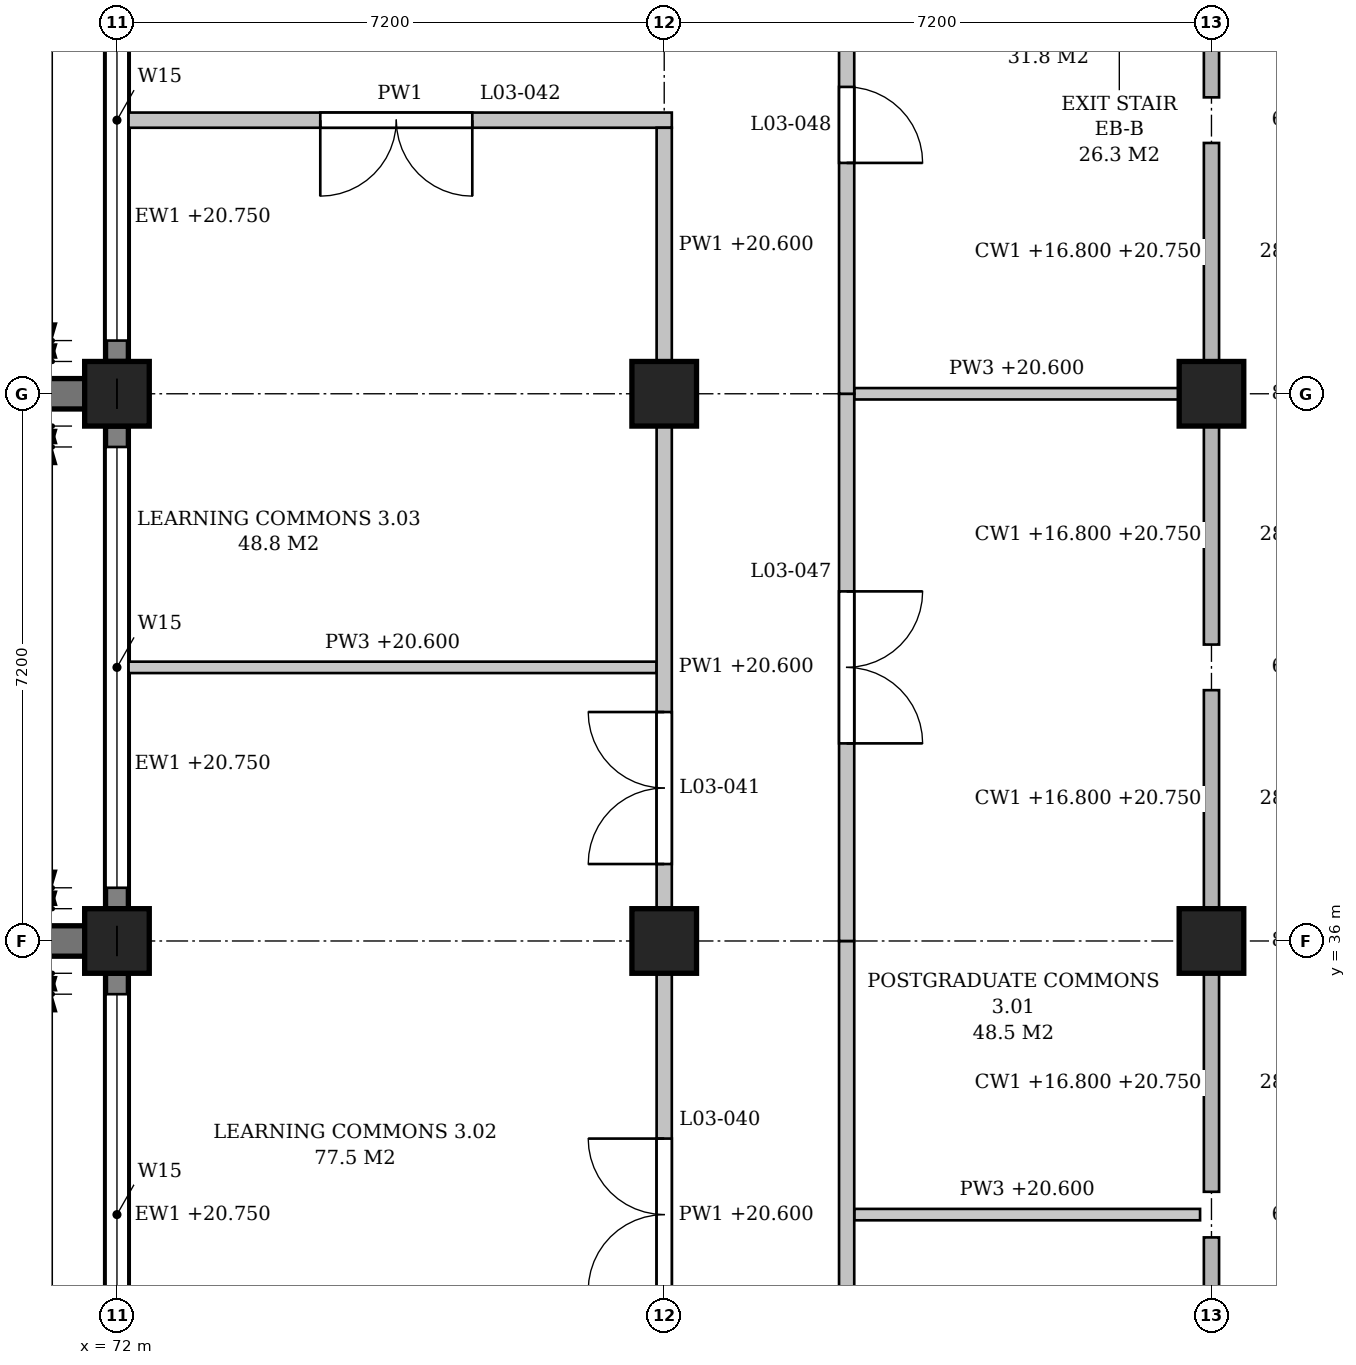
"""IFC4 building model, lengths in metres.
Left out: names, types, materials, properties, quantities, classifications, styles, units other than length and angle.
Written with IfcOpenShell. Run it as: python <this file> out.ifc"""

import sys

from ifc_helpers import new_model, si_unit, direction, frame, frame_2d, origin, origin_2d, place, context, subcontext, project, spatial, polyline, rectangle, outline, extrude, element, fill, save


model = new_model("IFC4")
c1 = context("Model", 3, precision=1e-05, world=origin(), true_north=direction((0.0, 1.0)))
c2 = subcontext(c1, "Body", "Model", "MODEL_VIEW")
j1 = project(units=[si_unit("LENGTHUNIT", "METRE"), si_unit("PLANEANGLEUNIT", "RADIAN")], contexts=[c1])
p1 = place(None, origin())
s1 = spatial("IfcSite", under=j1, at=p1, CompositionType="ELEMENT")
p2 = place(p1, origin())
s2 = spatial("IfcBuilding", under=s1, at=p2, CompositionType="ELEMENT")
p3 = place(p2, frame((0.0, 0.0, 16.8)))
s3 = spatial("IfcBuildingStorey", under=s2, at=p3, CompositionType="ELEMENT", Elevation=16.8)
for number, where, z_axis, x_axis in (
    (1, (72.0, 36.0, 0.0), (0.0, 0.0, 1.0), (1.0, 0.0, 0.0)),
    (2, (72.0, 43.2, 0.0), (0.0, 0.0, 1.0), (1.0, 0.0, 0.0)),
    (3, (79.2, 36.0, 0.0), (0.0, 0.0, 1.0), (1.0, 0.0, 0.0)),
    (4, (79.2, 43.2, 0.0), (0.0, 0.0, 1.0), (1.0, 0.0, 0.0)),
    (5, (86.4, 36.0, 0.0), (0.0, 0.0, 1.0), (1.0, 0.0, 0.0)),
    (6, (86.4, 43.2, 0.0), (0.0, 0.0, 1.0), (1.0, 0.0, 0.0)),
):
    element("IfcColumn", number, at=place(p3, frame(where, z_axis=z_axis, x_axis=x_axis)), inside=s3, PredefinedType="COLUMN", context=c2, shape_type="SweptSolid", body=[
        extrude(rectangle(XDim=0.85, YDim=0.85, at=origin_2d()), origin(), (0.0, 0.0, 1.0), 4.8),
    ])
p4 = place(p3, frame((72.0, 29.225, 0.0), z_axis=(0.0, 0.0, 1.0), x_axis=(0.0, 1.0, 0.0)))
e7 = element("IfcWall", 7, at=p4, inside=s3, PredefinedType="STANDARD", context=c2, shape_type="SweptSolid", body=[
    extrude(rectangle(XDim=6.35, YDim=0.3, at=frame_2d((3.175, 0.0))), origin(), (0.0, 0.0, 1.0), 3.95),
])
p5 = place(p4, frame((0.275, 0.0, 0.9)))
e8 = element("IfcOpeningElement", 8, at=p5, cuts=e7, PredefinedType="OPENING", context=c2, shape_type="SweptSolid", body=[
    extrude(outline(polyline([(0.0, 0.0), (5.8, 0.0), (5.8, 1.0), (2.9, 2.5), (0.0, 1.0), (0.0, 0.0)])), frame((0.0, 0.16, 0.0), z_axis=(0.0, -1.0, 0.0), x_axis=(1.0, 0.0, 0.0)), (0.0, 0.0, 1.0), 0.32),
])
p6 = place(p3, frame((72.0, 36.425, 0.0), z_axis=(0.0, 0.0, 1.0), x_axis=(0.0, 1.0, 0.0)))
e9 = element("IfcWall", 9, at=p6, inside=s3, PredefinedType="STANDARD", context=c2, shape_type="SweptSolid", body=[
    extrude(rectangle(XDim=6.35, YDim=0.3, at=frame_2d((3.175, 0.0))), origin(), (0.0, 0.0, 1.0), 3.95),
])
p7 = place(p6, frame((0.275, 0.0, 0.9)))
e10 = element("IfcOpeningElement", 10, at=p7, cuts=e9, PredefinedType="OPENING", context=c2, shape_type="SweptSolid", body=[
    extrude(outline(polyline([(0.0, 0.0), (5.8, 0.0), (5.8, 1.0), (2.9, 2.5), (0.0, 1.0), (0.0, 0.0)])), frame((0.0, 0.16, 0.0), z_axis=(0.0, -1.0, 0.0), x_axis=(1.0, 0.0, 0.0)), (0.0, 0.0, 1.0), 0.32),
])
p8 = place(p3, frame((72.0, 43.625, 0.0), z_axis=(0.0, 0.0, 1.0), x_axis=(0.0, 1.0, 0.0)))
e11 = element("IfcWall", 11, at=p8, inside=s3, PredefinedType="STANDARD", context=c2, shape_type="SweptSolid", body=[
    extrude(rectangle(XDim=6.35, YDim=0.3, at=frame_2d((3.175, 0.0))), origin(), (0.0, 0.0, 1.0), 3.95),
])
p9 = place(p8, frame((0.275, 0.0, 0.9)))
e12 = element("IfcOpeningElement", 12, at=p9, cuts=e11, PredefinedType="OPENING", context=c2, shape_type="SweptSolid", body=[
    extrude(outline(polyline([(0.0, 0.0), (5.8, 0.0), (5.8, 1.0), (2.9, 2.5), (0.0, 1.0), (0.0, 0.0)])), frame((0.0, 0.16, 0.0), z_axis=(0.0, -1.0, 0.0), x_axis=(1.0, 0.0, 0.0)), (0.0, 0.0, 1.0), 0.32),
])
for number, where, z_axis, x_axis in (
    (13, (71.575, 36.0, 0.0), (0.0, 0.0, 1.0), (-1.0, 0.0, 0.0)),
    (14, (71.575, 43.2, 0.0), (0.0, 0.0, 1.0), (-1.0, 0.0, 0.0)),
):
    element("IfcWall", number, at=place(p3, frame(where, z_axis=z_axis, x_axis=x_axis)), inside=s3, PredefinedType="POLYGONAL", context=c2, shape_type="SweptSolid", body=[
        extrude(outline(polyline([(0.6, 0.0), (0.6, 4.55), (0.0, 4.55), (0.0, 0.0), (0.6, 0.0)])), frame((0.0, 0.2, 0.0), z_axis=(0.0, -1.0, 0.0), x_axis=(1.0, 0.0, 0.0)), (0.0, 0.0, 1.0), 0.4),
    ])
p10 = place(p3, frame((81.7, 32.4, 0.0), z_axis=(0.0, 0.0, 1.0), x_axis=(1.0, 0.0, 0.0)))
e15 = element("IfcWall", 15, at=p10, inside=s3, PredefinedType="PARTITIONING", context=c2, shape_type="SweptSolid", body=[
    extrude(rectangle(XDim=4.55, YDim=0.15, at=frame_2d((2.275, 0.0))), origin(), (0.0, 0.0, 1.0), 3.8),
])
p11 = place(p3, frame((72.15, 39.6, 0.0), z_axis=(0.0, 0.0, 1.0), x_axis=(1.0, 0.0, 0.0)))
e16 = element("IfcWall", 16, at=p11, inside=s3, PredefinedType="PARTITIONING", context=c2, shape_type="SweptSolid", body=[
    extrude(rectangle(XDim=6.95, YDim=0.15, at=frame_2d((3.475, 0.0))), origin(), (0.0, 0.0, 1.0), 3.8),
])
p12 = place(p3, frame((81.7, 43.2, 0.0), z_axis=(0.0, 0.0, 1.0), x_axis=(1.0, 0.0, 0.0)))
e17 = element("IfcWall", 17, at=p12, inside=s3, PredefinedType="PARTITIONING", context=c2, shape_type="SweptSolid", body=[
    extrude(rectangle(XDim=4.275, YDim=0.15, at=frame_2d((2.138, 0.0))), origin(), (0.0, 0.0, 1.0), 3.8),
])
p13 = place(p3, frame((72.15, 46.8, 0.0), z_axis=(0.0, 0.0, 1.0), x_axis=(1.0, 0.0, 0.0)))
e18 = element("IfcWall", 18, at=p13, inside=s3, PredefinedType="PARTITIONING", context=c2, shape_type="SweptSolid", body=[
    extrude(outline(polyline([(0.0, 0.0), (7.15, 0.0), (7.15, 3.8), (6.8, 3.8), (6.8, 4.55), (0.1, 4.55), (0.1, 3.95), (0.0, 3.95), (0.0, 0.0)])), frame((0.0, 0.1, 0.0), z_axis=(0.0, -1.0, 0.0), x_axis=(1.0, 0.0, 0.0)), (0.0, 0.0, 1.0), 0.2),
])
p14 = place(p13, frame((2.525, 0.0, 0.0)))
e19 = element("IfcOpeningElement", 19, at=p14, cuts=e18, PredefinedType="OPENING", context=c2, shape_type="SweptSolid", body=[
    extrude(rectangle(XDim=2.0, YDim=2.1, at=frame_2d((1.0, 1.05))), frame((0.0, 0.11, 0.0), z_axis=(0.0, -1.0, 0.0), x_axis=(1.0, 0.0, 0.0)), (0.0, 0.0, 1.0), 0.22),
])
p15 = place(p3, frame((79.2, 29.225, 0.0), z_axis=(0.0, 0.0, 1.0), x_axis=(0.0, 1.0, 0.0)))
e20 = element("IfcWall", 20, at=p15, inside=s3, PredefinedType="PARTITIONING", context=c2, shape_type="SweptSolid", body=[
    extrude(rectangle(XDim=6.35, YDim=0.2, at=frame_2d((3.175, 0.0))), origin(), (0.0, 0.0, 1.0), 3.8),
])
p16 = place(p15, frame((2.175, 0.0, 0.0)))
e21 = element("IfcOpeningElement", 21, at=p16, cuts=e20, PredefinedType="OPENING", context=c2, shape_type="SweptSolid", body=[
    extrude(rectangle(XDim=2.0, YDim=2.1, at=frame_2d((1.0, 1.05))), frame((0.0, 0.11, 0.0), z_axis=(0.0, -1.0, 0.0), x_axis=(1.0, 0.0, 0.0)), (0.0, 0.0, 1.0), 0.22),
])
p17 = place(p3, frame((79.2, 36.425, 0.0), z_axis=(0.0, 0.0, 1.0), x_axis=(0.0, 1.0, 0.0)))
e22 = element("IfcWall", 22, at=p17, inside=s3, PredefinedType="PARTITIONING", context=c2, shape_type="SweptSolid", body=[
    extrude(rectangle(XDim=6.35, YDim=0.2, at=frame_2d((3.175, 0.0))), origin(), (0.0, 0.0, 1.0), 3.8),
])
p18 = place(p17, frame((0.587, 0.0, 0.0)))
e23 = element("IfcOpeningElement", 23, at=p18, cuts=e22, PredefinedType="OPENING", context=c2, shape_type="SweptSolid", body=[
    extrude(rectangle(XDim=2.0, YDim=2.1, at=frame_2d((1.0, 1.05))), frame((0.0, 0.11, 0.0), z_axis=(0.0, -1.0, 0.0), x_axis=(1.0, 0.0, 0.0)), (0.0, 0.0, 1.0), 0.22),
])
p19 = place(p3, frame((79.2, 43.625, 0.0), z_axis=(0.0, 0.0, 1.0), x_axis=(0.0, 1.0, 0.0)))
e24 = element("IfcWall", 24, at=p19, inside=s3, PredefinedType="PARTITIONING", context=c2, shape_type="SweptSolid", body=[
    extrude(rectangle(XDim=3.075, YDim=0.2, at=frame_2d((1.538, 0.0))), origin(), (0.0, 0.0, 1.0), 3.8),
])
p20 = place(p3, frame((81.6, 28.8, 0.0), z_axis=(0.0, 0.0, 1.0), x_axis=(0.0, 1.0, 0.0)))
e25 = element("IfcWall", 25, at=p20, inside=s3, PredefinedType="PARTITIONING", context=c2, shape_type="SweptSolid", body=[
    extrude(outline(polyline([(0.0, 0.0), (7.2, 0.0), (7.2, 3.8), (6.95, 3.8), (6.95, 4.55), (0.25, 4.55), (0.25, 3.8), (0.0, 3.8), (0.0, 0.0)])), frame((0.0, 0.1, 0.0), z_axis=(0.0, -1.0, 0.0), x_axis=(1.0, 0.0, 0.0)), (0.0, 0.0, 1.0), 0.2),
])
p21 = place(p3, frame((81.6, 36.0, 0.0), z_axis=(0.0, 0.0, 1.0), x_axis=(0.0, 1.0, 0.0)))
e26 = element("IfcWall", 26, at=p21, inside=s3, PredefinedType="PARTITIONING", context=c2, shape_type="SweptSolid", body=[
    extrude(outline(polyline([(0.0, 0.0), (7.2, 0.0), (7.2, 3.8), (6.95, 3.8), (6.95, 4.55), (0.25, 4.55), (0.25, 3.8), (0.0, 3.8), (0.0, 0.0)])), frame((0.0, 0.1, 0.0), z_axis=(0.0, -1.0, 0.0), x_axis=(1.0, 0.0, 0.0)), (0.0, 0.0, 1.0), 0.2),
])
p22 = place(p21, frame((2.6, 0.0, 0.0)))
e27 = element("IfcOpeningElement", 27, at=p22, cuts=e26, PredefinedType="OPENING", context=c2, shape_type="SweptSolid", body=[
    extrude(rectangle(XDim=2.0, YDim=2.1, at=frame_2d((1.0, 1.05))), frame((0.0, 0.11, 0.0), z_axis=(0.0, -1.0, 0.0), x_axis=(1.0, 0.0, 0.0)), (0.0, 0.0, 1.0), 0.22),
])
p23 = place(p3, frame((81.6, 43.2, 0.0), z_axis=(0.0, 0.0, 1.0), x_axis=(0.0, 1.0, 0.0)))
e28 = element("IfcWall", 28, at=p23, inside=s3, PredefinedType="PARTITIONING", context=c2, shape_type="SweptSolid", body=[
    extrude(outline(polyline([(0.0, 0.0), (7.075, 0.0), (7.075, 3.8), (6.95, 3.8), (6.95, 4.55), (0.25, 4.55), (0.25, 3.8), (0.0, 3.8), (0.0, 0.0)])), frame((0.0, 0.1, 0.0), z_axis=(0.0, -1.0, 0.0), x_axis=(1.0, 0.0, 0.0)), (0.0, 0.0, 1.0), 0.2),
])
p24 = place(p23, frame((3.038, 0.0, 0.0)))
e29 = element("IfcOpeningElement", 29, at=p24, cuts=e28, PredefinedType="OPENING", context=c2, shape_type="SweptSolid", body=[
    extrude(rectangle(XDim=1.0, YDim=2.1, at=frame_2d((0.5, 1.05))), frame((0.0, 0.11, 0.0), z_axis=(0.0, -1.0, 0.0), x_axis=(1.0, 0.0, 0.0)), (0.0, 0.0, 1.0), 0.22),
])
p25 = place(p5, origin())
e30 = element("IfcWindow", 30, at=p25, inside=s3, PartitioningType="TRIPLE_PANEL_VERTICAL", PredefinedType="WINDOW", context=c2, shape_type="SweptSolid", body=[
    extrude(outline(polyline([(0.0, 0.0), (5.8, 0.0), (5.8, 1.0), (2.9, 2.5), (0.0, 1.0), (0.0, 0.0)])), frame((0.0, 0.03, 0.0), z_axis=(0.0, -1.0, 0.0), x_axis=(1.0, 0.0, 0.0)), (0.0, 0.0, 1.0), 0.06),
])
fill(e8, e30)
p26 = place(p7, origin())
e31 = element("IfcWindow", 31, at=p26, inside=s3, PartitioningType="TRIPLE_PANEL_VERTICAL", PredefinedType="WINDOW", context=c2, shape_type="SweptSolid", body=[
    extrude(outline(polyline([(0.0, 0.0), (5.8, 0.0), (5.8, 1.0), (2.9, 2.5), (0.0, 1.0), (0.0, 0.0)])), frame((0.0, 0.03, 0.0), z_axis=(0.0, -1.0, 0.0), x_axis=(1.0, 0.0, 0.0)), (0.0, 0.0, 1.0), 0.06),
])
fill(e10, e31)
p27 = place(p9, origin())
e32 = element("IfcWindow", 32, at=p27, inside=s3, PartitioningType="TRIPLE_PANEL_VERTICAL", PredefinedType="WINDOW", context=c2, shape_type="SweptSolid", body=[
    extrude(outline(polyline([(0.0, 0.0), (5.8, 0.0), (5.8, 1.0), (2.9, 2.5), (0.0, 1.0), (0.0, 0.0)])), frame((0.0, 0.03, 0.0), z_axis=(0.0, -1.0, 0.0), x_axis=(1.0, 0.0, 0.0)), (0.0, 0.0, 1.0), 0.06),
])
fill(e12, e32)
p28 = place(p16, origin())
e33 = element("IfcDoor", 33, at=p28, inside=s3, OperationType="DOUBLE_DOOR_SINGLE_SWING", PredefinedType="DOOR", context=c2, shape_type="SweptSolid", body=[
    extrude(rectangle(XDim=2.0, YDim=2.1, at=frame_2d((1.0, 1.05))), frame((0.0, 0.025, 0.0), z_axis=(0.0, -1.0, 0.0), x_axis=(1.0, 0.0, 0.0)), (0.0, 0.0, 1.0), 0.05),
])
fill(e21, e33)
p29 = place(p18, origin())
e34 = element("IfcDoor", 34, at=p29, inside=s3, OperationType="DOUBLE_DOOR_SINGLE_SWING", PredefinedType="DOOR", context=c2, shape_type="SweptSolid", body=[
    extrude(rectangle(XDim=2.0, YDim=2.1, at=frame_2d((1.0, 1.05))), frame((0.0, 0.025, 0.0), z_axis=(0.0, -1.0, 0.0), x_axis=(1.0, 0.0, 0.0)), (0.0, 0.0, 1.0), 0.05),
])
fill(e23, e34)
p30 = place(p14, origin())
e35 = element("IfcDoor", 35, at=p30, inside=s3, OperationType="DOUBLE_DOOR_SINGLE_SWING", PredefinedType="DOOR", context=c2, shape_type="SweptSolid", body=[
    extrude(rectangle(XDim=2.0, YDim=2.1, at=frame_2d((1.0, 1.05))), frame((0.0, 0.025, 0.0), z_axis=(0.0, -1.0, 0.0), x_axis=(1.0, 0.0, 0.0)), (0.0, 0.0, 1.0), 0.05),
])
fill(e19, e35)
p31 = place(p22, origin())
e36 = element("IfcDoor", 36, at=p31, inside=s3, OperationType="DOUBLE_DOOR_SINGLE_SWING", PredefinedType="DOOR", context=c2, shape_type="SweptSolid", body=[
    extrude(rectangle(XDim=2.0, YDim=2.1, at=frame_2d((1.0, 1.05))), frame((0.0, 0.025, 0.0), z_axis=(0.0, -1.0, 0.0), x_axis=(1.0, 0.0, 0.0)), (0.0, 0.0, 1.0), 0.05),
])
fill(e27, e36)
p32 = place(p24, frame((1.0, 0.0, 0.0), z_axis=(0.0, 0.0, 1.0), x_axis=(-1.0, 0.0, 0.0)))
e37 = element("IfcDoor", 37, at=p32, inside=s3, OperationType="SINGLE_SWING_RIGHT", PredefinedType="DOOR", context=c2, shape_type="SweptSolid", body=[
    extrude(rectangle(XDim=1.0, YDim=2.1, at=frame_2d((0.5, 1.05))), frame((0.0, 0.025, 0.0), z_axis=(0.0, -1.0, 0.0), x_axis=(1.0, 0.0, 0.0)), (0.0, 0.0, 1.0), 0.05),
])
fill(e29, e37)
save(model, sys.argv[1])
